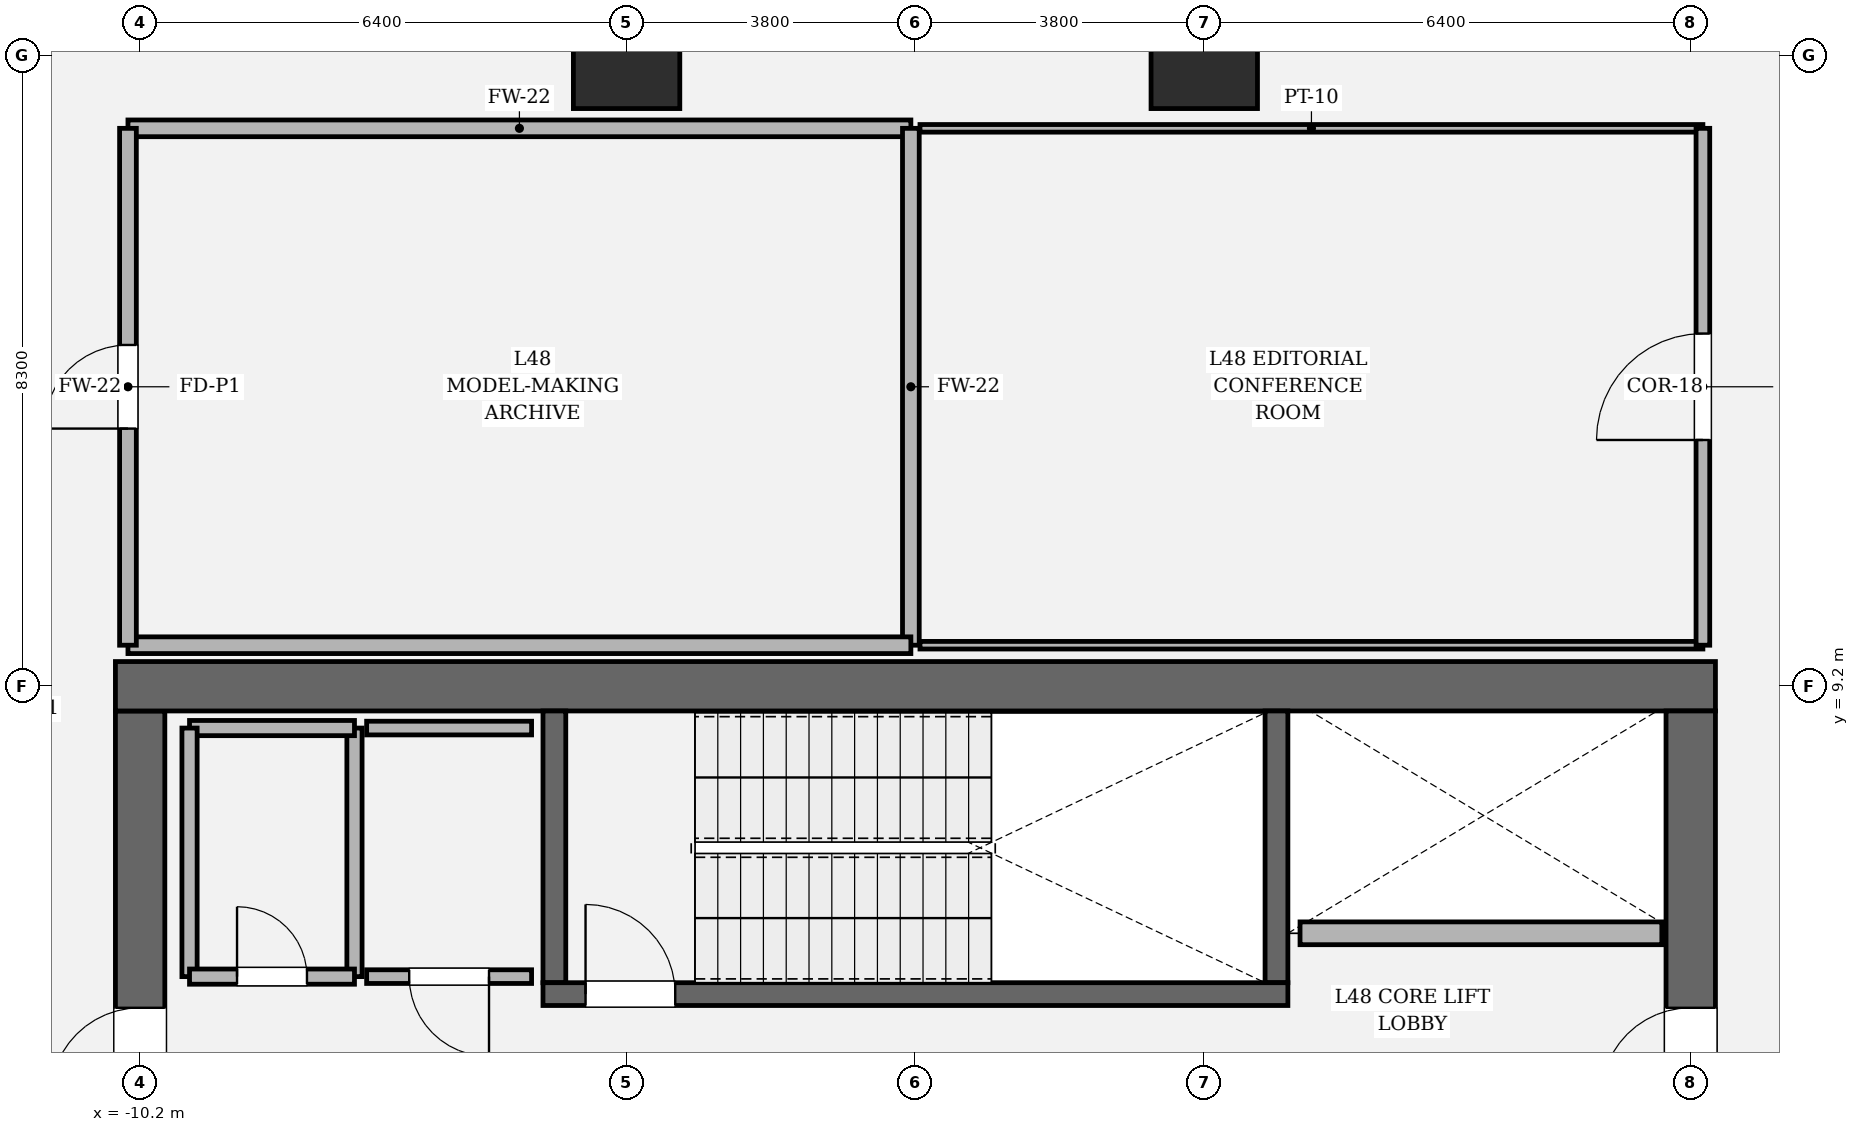
"""IFC4 building model, lengths in metres.
Left out: names, types, materials, properties, quantities, classifications, styles, units other than length and angle.
Written with IfcOpenShell. Run it as: python <this file> out.ifc"""

import sys

from ifc_helpers import new_model, si_unit, direction, frame, frame_2d, origin, origin_2d, place, context, subcontext, project, spatial, rectangle, hollow_rectangle, extrude, element, fill, save


model = new_model("IFC4")
c1 = context("Model", 3, precision=1e-05, world=origin(), true_north=direction((0.0, 1.0)))
c2 = subcontext(c1, "Body", "Model", "MODEL_VIEW")
j1 = project(units=[si_unit("LENGTHUNIT", "METRE"), si_unit("PLANEANGLEUNIT", "RADIAN")], contexts=[c1])
p1 = place(None, origin())
s1 = spatial("IfcSite", under=j1, at=p1, CompositionType="ELEMENT")
p2 = place(p1, origin())
s2 = spatial("IfcBuilding", under=s1, at=p2, CompositionType="ELEMENT")
p3 = place(p2, frame((0.0, 0.0, 204.6)))
s3 = spatial("IfcBuildingStorey", under=s2, at=p3, CompositionType="ELEMENT", Elevation=204.6)
p4 = place(p3, frame((-10.2, -8.875, 0.0), z_axis=(0.0, 0.0, 1.0), x_axis=(0.0, 1.0, 0.0)))
e1 = element("IfcWall", 1, at=p4, inside=s3, PredefinedType="SHEAR", context=c2, shape_type="SweptSolid", body=[
    extrude(rectangle(XDim=17.75, YDim=0.65, at=frame_2d((8.875, 0.0))), origin(), (0.0, 0.0, 1.0), 4.05),
])
p5 = place(p4, frame((12.665, 0.0, 0.0)))
e2 = element("IfcOpeningElement", 2, at=p5, cuts=e1, PredefinedType="OPENING", context=c2, shape_type="SweptSolid", body=[
    extrude(rectangle(XDim=1.18, YDim=2.2, at=frame_2d((0.59, 1.1))), frame((0.0, 0.335, 0.0), z_axis=(0.0, -1.0, 0.0), x_axis=(1.0, 0.0, 0.0)), (0.0, 0.0, 1.0), 0.67),
])
p6 = place(p3, frame((-10.525, 9.2, 0.0), z_axis=(0.0, 0.0, 1.0), x_axis=(1.0, 0.0, 0.0)))
e3 = element("IfcWall", 3, at=p6, inside=s3, PredefinedType="SHEAR", context=c2, shape_type="SweptSolid", body=[
    extrude(rectangle(XDim=21.05, YDim=0.65, at=frame_2d((10.525, 0.0))), origin(), (0.0, 0.0, 1.0), 4.05),
])
p7 = place(p3, frame((10.2, 8.875, 0.0), z_axis=(0.0, 0.0, 1.0), x_axis=(0.0, -1.0, 0.0)))
e4 = element("IfcWall", 4, at=p7, inside=s3, PredefinedType="SHEAR", context=c2, shape_type="SweptSolid", body=[
    extrude(rectangle(XDim=17.75, YDim=0.65, at=frame_2d((8.875, 0.0))), origin(), (0.0, 0.0, 1.0), 4.05),
])
p8 = place(p7, frame((3.905, 0.0, 0.0)))
e5 = element("IfcOpeningElement", 5, at=p8, cuts=e4, PredefinedType="OPENING", context=c2, shape_type="SweptSolid", body=[
    extrude(rectangle(XDim=1.18, YDim=2.2, at=frame_2d((0.59, 1.1))), frame((0.0, 0.335, 0.0), z_axis=(0.0, -1.0, 0.0), x_axis=(1.0, 0.0, 0.0)), (0.0, 0.0, 1.0), 0.67),
])
for number, where, z_axis, x_axis in (
    (6, (-4.75, 5.3, 0.0), (0.0, 0.0, 1.0), (0.0, 1.0, 0.0)),
    (7, (4.75, 8.875, 0.0), (0.0, 0.0, 1.0), (0.0, -1.0, 0.0)),
):
    element("IfcWall", number, at=place(p3, frame(where, z_axis=z_axis, x_axis=x_axis)), inside=s3, PredefinedType="SOLIDWALL", context=c2, shape_type="SweptSolid", body=[
        extrude(rectangle(XDim=3.575, YDim=0.3, at=frame_2d((1.788, 0.0))), origin(), (0.0, 0.0, 1.0), 4.05),
    ])
p9 = place(p3, frame((-4.9, 5.15, 0.0), z_axis=(0.0, 0.0, 1.0), x_axis=(1.0, 0.0, 0.0)))
e8 = element("IfcWall", 8, at=p9, inside=s3, PredefinedType="SOLIDWALL", context=c2, shape_type="SweptSolid", body=[
    extrude(rectangle(XDim=9.8, YDim=0.3, at=frame_2d((4.9, 0.0))), origin(), (0.0, 0.0, 1.0), 4.05),
])
p10 = place(p9, frame((0.56, 0.0, 0.0)))
e9 = element("IfcOpeningElement", 9, at=p10, cuts=e8, PredefinedType="OPENING", context=c2, shape_type="SweptSolid", body=[
    extrude(rectangle(XDim=1.18, YDim=2.2, at=frame_2d((0.59, 1.1))), frame((0.0, 0.16, 0.0), z_axis=(0.0, -1.0, 0.0), x_axis=(1.0, 0.0, 0.0)), (0.0, 0.0, 1.0), 0.32),
])
for number, where, z_axis, x_axis in (
    (10, (3.8, 17.5, 0.0), (0.0, 0.0, 1.0), (1.0, 0.0, 0.0)),
    (11, (-3.8, 17.5, 0.0), (0.0, 0.0, 1.0), (1.0, 0.0, 0.0)),
):
    element("IfcColumn", number, at=place(p3, frame(where, z_axis=z_axis, x_axis=x_axis)), inside=s3, PredefinedType="COLUMN", context=c2, shape_type="SweptSolid", body=[
        extrude(hollow_rectangle(XDim=1.4, YDim=1.4, WallThickness=0.042, at=origin_2d()), origin(), (0.0, 0.0, 1.0), 4.05),
    ])
p11 = place(p3, frame((5.06, 5.95, 0.0), z_axis=(0.0, 0.0, 1.0), x_axis=(1.0, 0.0, 0.0)))
e12 = element("IfcWall", 12, at=p11, inside=s3, PredefinedType="SOLIDWALL", context=c2, shape_type="SweptSolid", body=[
    extrude(rectangle(XDim=4.76, YDim=0.3, at=frame_2d((2.38, 0.0))), origin(), (0.0, 0.0, 1.0), 3.83),
])
p12 = place(p3, frame((-7.38, 5.38, 0.0), z_axis=(0.0, 0.0, 1.0), x_axis=(0.0, 1.0, 0.0)))
e13 = element("IfcWall", 13, at=p12, inside=s3, PredefinedType="SOLIDWALL", context=c2, shape_type="SweptSolid", body=[
    extrude(rectangle(XDim=3.27, YDim=0.2, at=frame_2d((1.635, 0.0))), origin(), (0.0, 0.0, 1.0), 3.83),
])
p13 = place(p3, frame((-7.38, 8.65, 0.0), z_axis=(0.0, 0.0, 1.0), x_axis=(-1.0, 0.0, 0.0)))
e14 = element("IfcWall", 14, at=p13, inside=s3, PredefinedType="SOLIDWALL", context=c2, shape_type="SweptSolid", body=[
    extrude(rectangle(XDim=2.17, YDim=0.2, at=frame_2d((1.085, 0.0))), origin(), (0.0, 0.0, 1.0), 3.83),
])
p14 = place(p3, frame((-9.55, 8.65, 0.0), z_axis=(0.0, 0.0, 1.0), x_axis=(0.0, -1.0, 0.0)))
e15 = element("IfcWall", 15, at=p14, inside=s3, PredefinedType="SOLIDWALL", context=c2, shape_type="SweptSolid", body=[
    extrude(rectangle(XDim=3.27, YDim=0.2, at=frame_2d((1.635, 0.0))), origin(), (0.0, 0.0, 1.0), 3.83),
])
p15 = place(p3, frame((-9.55, 5.38, 0.0), z_axis=(0.0, 0.0, 1.0), x_axis=(1.0, 0.0, 0.0)))
e16 = element("IfcWall", 16, at=p15, inside=s3, PredefinedType="SOLIDWALL", context=c2, shape_type="SweptSolid", body=[
    extrude(rectangle(XDim=2.17, YDim=0.2, at=frame_2d((1.085, 0.0))), origin(), (0.0, 0.0, 1.0), 3.83),
])
p16 = place(p15, frame((0.625, 0.0, 0.0)))
e17 = element("IfcOpeningElement", 17, at=p16, cuts=e16, PredefinedType="OPENING", context=c2, shape_type="SweptSolid", body=[
    extrude(rectangle(XDim=0.92, YDim=2.1, at=frame_2d((0.46, 1.05))), frame((0.0, 0.11, 0.0), z_axis=(0.0, -1.0, 0.0), x_axis=(1.0, 0.0, 0.0)), (0.0, 0.0, 1.0), 0.22),
])
p17 = place(p3, frame((-5.05, 8.65, 0.0), z_axis=(0.0, 0.0, 1.0), x_axis=(-1.0, 0.0, 0.0)))
e18 = element("IfcWall", 18, at=p17, inside=s3, PredefinedType="PARTITIONING", context=c2, shape_type="SweptSolid", body=[
    extrude(rectangle(XDim=2.17, YDim=0.18, at=frame_2d((1.085, 0.0))), origin(), (0.0, 0.0, 1.0), 3.83),
])
p18 = place(p3, frame((-7.22, 5.38, 0.0), z_axis=(0.0, 0.0, 1.0), x_axis=(1.0, 0.0, 0.0)))
e19 = element("IfcWall", 19, at=p18, inside=s3, PredefinedType="PARTITIONING", context=c2, shape_type="SweptSolid", body=[
    extrude(rectangle(XDim=2.17, YDim=0.18, at=frame_2d((1.085, 0.0))), origin(), (0.0, 0.0, 1.0), 3.83),
])
p19 = place(p18, frame((0.56, 0.0, 0.0)))
e20 = element("IfcOpeningElement", 20, at=p19, cuts=e19, PredefinedType="OPENING", context=c2, shape_type="SweptSolid", body=[
    extrude(rectangle(XDim=1.05, YDim=2.2, at=frame_2d((0.525, 1.1))), frame((0.0, 0.1, 0.0), z_axis=(0.0, -1.0, 0.0), x_axis=(1.0, 0.0, 0.0)), (0.0, 0.0, 1.0), 0.2),
])
p20 = place(p3, frame((-10.36, 16.54, 0.0), z_axis=(0.0, 0.0, 1.0), x_axis=(1.0, 0.0, 0.0)))
e21 = element("IfcWall", 21, at=p20, inside=s3, PredefinedType="SOLIDWALL", context=c2, shape_type="SweptSolid", body=[
    extrude(rectangle(XDim=10.3, YDim=0.22, at=frame_2d((5.15, 0.0))), origin(), (0.0, 0.0, 1.0), 3.174),
])
p21 = place(p3, frame((-0.06, 16.54, 0.0), z_axis=(0.0, 0.0, 1.0), x_axis=(0.0, -1.0, 0.0)))
e22 = element("IfcWall", 22, at=p21, inside=s3, PredefinedType="SOLIDWALL", context=c2, shape_type="SweptSolid", body=[
    extrude(rectangle(XDim=6.8, YDim=0.22, at=frame_2d((3.4, 0.0))), origin(), (0.0, 0.0, 1.0), 3.83),
])
p22 = place(p3, frame((-0.06, 9.74, 0.0), z_axis=(0.0, 0.0, 1.0), x_axis=(-1.0, 0.0, 0.0)))
e23 = element("IfcWall", 23, at=p22, inside=s3, PredefinedType="SOLIDWALL", context=c2, shape_type="SweptSolid", body=[
    extrude(rectangle(XDim=10.3, YDim=0.22, at=frame_2d((5.15, 0.0))), origin(), (0.0, 0.0, 1.0), 3.174),
])
p23 = place(p3, frame((-10.36, 9.74, 0.0), z_axis=(0.0, 0.0, 1.0), x_axis=(0.0, 1.0, 0.0)))
e24 = element("IfcWall", 24, at=p23, inside=s3, PredefinedType="SOLIDWALL", context=c2, shape_type="SweptSolid", body=[
    extrude(rectangle(XDim=6.8, YDim=0.22, at=frame_2d((3.4, 0.0))), origin(), (0.0, 0.0, 1.0), 3.174),
])
p24 = place(p23, frame((2.85, 0.0, 0.0)))
e25 = element("IfcOpeningElement", 25, at=p24, cuts=e24, PredefinedType="OPENING", context=c2, shape_type="SweptSolid", body=[
    extrude(rectangle(XDim=1.1, YDim=2.2, at=frame_2d((0.55, 1.1))), frame((0.0, 0.12, 0.0), z_axis=(0.0, -1.0, 0.0), x_axis=(1.0, 0.0, 0.0)), (0.0, 0.0, 1.0), 0.24),
])
for number, where, z_axis, x_axis in (
    (26, (10.36, 9.74, 0.0), (0.0, 0.0, 1.0), (-1.0, 0.0, 0.0)),
    (27, (0.06, 16.54, 0.0), (0.0, 0.0, 1.0), (1.0, 0.0, 0.0)),
):
    element("IfcWall", number, at=place(p3, frame(where, z_axis=z_axis, x_axis=x_axis)), inside=s3, PredefinedType="PARTITIONING", context=c2, shape_type="SweptSolid", body=[
        extrude(rectangle(XDim=10.3, YDim=0.1, at=frame_2d((5.15, 0.0))), origin(), (0.0, 0.0, 1.0), 3.174),
    ])
p25 = place(p3, frame((10.36, 16.54, 0.0), z_axis=(0.0, 0.0, 1.0), x_axis=(0.0, -1.0, 0.0)))
e28 = element("IfcWall", 28, at=p25, inside=s3, PredefinedType="PARTITIONING", context=c2, shape_type="SweptSolid", body=[
    extrude(rectangle(XDim=6.8, YDim=0.18, at=frame_2d((3.4, 0.0))), origin(), (0.0, 0.0, 1.0), 3.174),
])
p26 = place(p25, frame((2.7, 0.0, 0.0)))
e29 = element("IfcOpeningElement", 29, at=p26, cuts=e28, PredefinedType="OPENING", context=c2, shape_type="SweptSolid", body=[
    extrude(rectangle(XDim=1.4, YDim=2.25, at=frame_2d((0.7, 1.125))), frame((0.0, 0.1, 0.0), z_axis=(0.0, -1.0, 0.0), x_axis=(1.0, 0.0, 0.0)), (0.0, 0.0, 1.0), 0.2),
])
p27 = place(p10, origin())
e30 = element("IfcDoor", 30, at=p27, inside=s3, OperationType="SINGLE_SWING_LEFT", PredefinedType="DOOR", context=c2, shape_type="SweptSolid", body=[
    extrude(rectangle(XDim=1.18, YDim=2.2, at=frame_2d((0.59, 1.1))), frame((0.0, 0.025, 0.0), z_axis=(0.0, -1.0, 0.0), x_axis=(1.0, 0.0, 0.0)), (0.0, 0.0, 1.0), 0.05),
])
fill(e9, e30)
p28 = place(p5, origin())
e31 = element("IfcDoor", 31, at=p28, inside=s3, OperationType="SINGLE_SWING_LEFT", PredefinedType="DOOR", context=c2, shape_type="SweptSolid", body=[
    extrude(rectangle(XDim=1.18, YDim=2.2, at=frame_2d((0.59, 1.1))), frame((0.0, 0.025, 0.0), z_axis=(0.0, -1.0, 0.0), x_axis=(1.0, 0.0, 0.0)), (0.0, 0.0, 1.0), 0.05),
])
fill(e2, e31)
p29 = place(p8, origin())
e32 = element("IfcDoor", 32, at=p29, inside=s3, OperationType="SINGLE_SWING_RIGHT", PredefinedType="DOOR", context=c2, shape_type="SweptSolid", body=[
    extrude(rectangle(XDim=1.18, YDim=2.2, at=frame_2d((0.59, 1.1))), frame((0.0, 0.025, 0.0), z_axis=(0.0, -1.0, 0.0), x_axis=(1.0, 0.0, 0.0)), (0.0, 0.0, 1.0), 0.05),
])
fill(e5, e32)
p30 = place(p16, origin())
e33 = element("IfcDoor", 33, at=p30, inside=s3, OperationType="SINGLE_SWING_LEFT", PredefinedType="DOOR", context=c2, shape_type="SweptSolid", body=[
    extrude(rectangle(XDim=0.92, YDim=2.1, at=frame_2d((0.46, 1.05))), frame((0.0, 0.025, 0.0), z_axis=(0.0, -1.0, 0.0), x_axis=(1.0, 0.0, 0.0)), (0.0, 0.0, 1.0), 0.05),
])
fill(e17, e33)
p31 = place(p19, origin())
e34 = element("IfcDoor", 34, at=p31, inside=s3, OperationType="SINGLE_SWING_RIGHT", PredefinedType="DOOR", context=c2, shape_type="SweptSolid", body=[
    extrude(rectangle(XDim=1.05, YDim=2.2, at=frame_2d((0.525, 1.1))), frame((0.0, 0.025, 0.0), z_axis=(0.0, -1.0, 0.0), x_axis=(1.0, 0.0, 0.0)), (0.0, 0.0, 1.0), 0.05),
])
fill(e20, e34)
p32 = place(p24, origin())
e35 = element("IfcDoor", 35, at=p32, inside=s3, OperationType="SINGLE_SWING_LEFT", PredefinedType="DOOR", context=c2, shape_type="SweptSolid", body=[
    extrude(rectangle(XDim=1.1, YDim=2.2, at=frame_2d((0.55, 1.1))), frame((0.0, 0.025, 0.0), z_axis=(0.0, -1.0, 0.0), x_axis=(1.0, 0.0, 0.0)), (0.0, 0.0, 1.0), 0.05),
])
fill(e25, e35)
p33 = place(p26, origin())
e36 = element("IfcDoor", 36, at=p33, inside=s3, OperationType="SINGLE_SWING_RIGHT", PredefinedType="DOOR", context=c2, shape_type="SweptSolid", body=[
    extrude(rectangle(XDim=1.4, YDim=2.25, at=frame_2d((0.7, 1.125))), frame((0.0, 0.025, 0.0), z_axis=(0.0, -1.0, 0.0), x_axis=(1.0, 0.0, 0.0)), (0.0, 0.0, 1.0), 0.05),
])
fill(e29, e36)
save(model, sys.argv[1])
